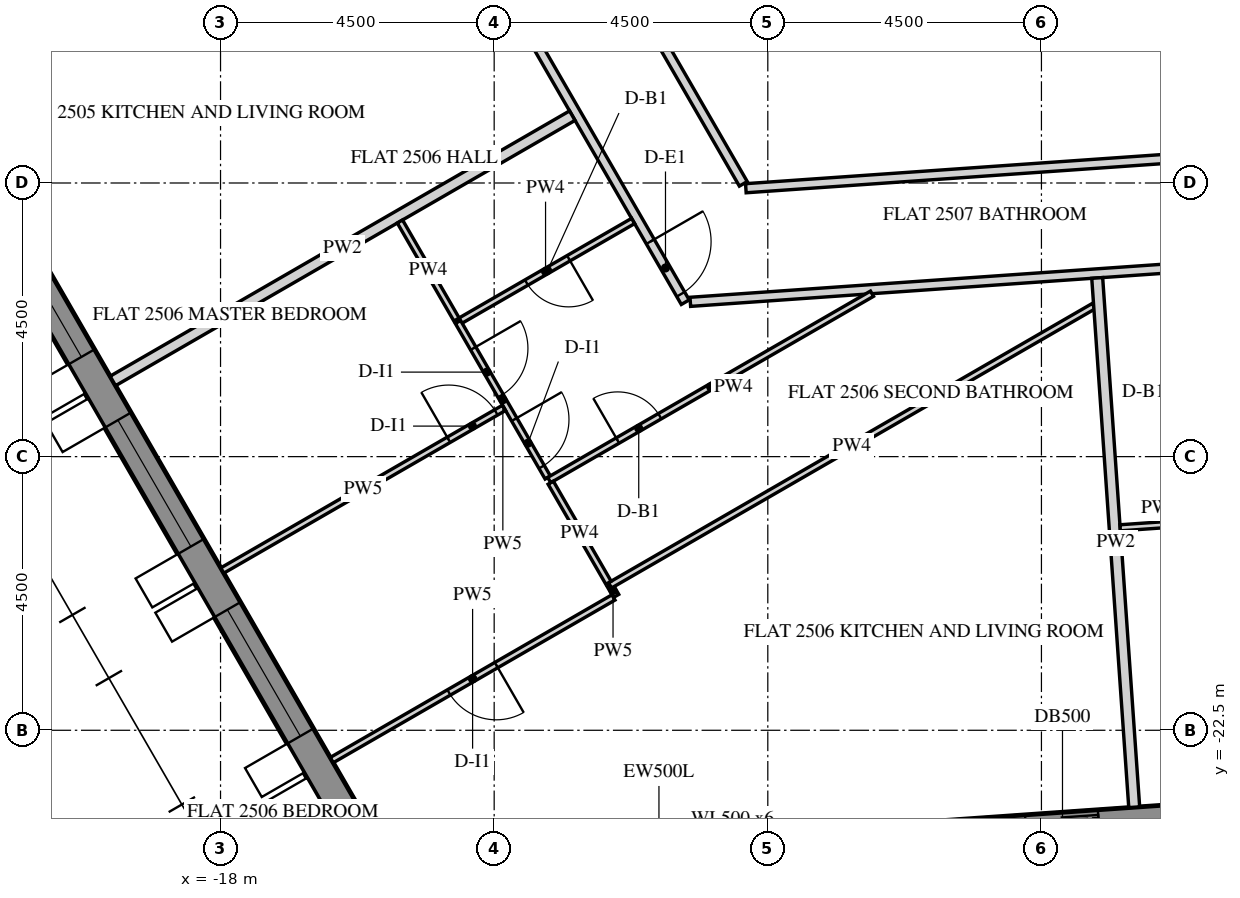
"""IFC4 building model, lengths in metres.
Left out: names, types, materials, properties, quantities, classifications, styles, units other than length and angle.
Written with IfcOpenShell. Run it as: python <this file> out.ifc"""

import sys

from ifc_helpers import new_model, si_unit, direction, frame, frame_2d, origin, place, context, subcontext, project, spatial, polyline, rectangle, outline, extrude, element, fill, save


model = new_model("IFC4")
c1 = context("Model", 3, precision=1e-05, world=origin(), true_north=direction((0.0, 1.0)))
c2 = subcontext(c1, "Body", "Model", "MODEL_VIEW")
j1 = project(units=[si_unit("LENGTHUNIT", "METRE"), si_unit("PLANEANGLEUNIT", "RADIAN")], contexts=[c1])
p1 = place(None, origin())
s1 = spatial("IfcSite", under=j1, at=p1, CompositionType="ELEMENT")
p2 = place(p1, origin())
s2 = spatial("IfcBuilding", under=s1, at=p2, CompositionType="ELEMENT")
p3 = place(p2, frame((0.0, 0.0, 314.7)))
s3 = spatial("IfcBuildingStorey", under=s2, at=p3, CompositionType="ELEMENT", Elevation=314.7)
p4 = place(p3, frame((-28.149, -2.745, -0.15), z_axis=(0.0, 0.0, 1.0), x_axis=(0.500003737743, -0.866023245787, 0.0)))
e1 = element("IfcWall", 1, at=p4, inside=s3, PredefinedType="SOLIDWALL", context=c2, shape_type="SweptSolid", body=[
    extrude(outline(polyline([(-0.021, -0.25), (25.468, -0.25), (25.421, 0.25), (0.021, 0.25), (-0.021, -0.25)])), origin(), (0.0, 0.0, 1.0), 3.9),
])
p5 = place(p4, frame((2.522, 0.0, 0.75)))
e2 = element("IfcOpeningElement", 2, at=p5, cuts=e1, PredefinedType="OPENING", context=c2, shape_type="SweptSolid", body=[
    extrude(rectangle(XDim=2.4, YDim=2.7, at=frame_2d((1.2, 1.35))), frame((0.0, 0.26, 0.0), z_axis=(0.0, -1.0, 0.0), x_axis=(1.0, 0.0, 0.0)), (0.0, 0.0, 1.0), 0.52),
])
p6 = place(p4, frame((6.122, 0.0, 0.75)))
e3 = element("IfcOpeningElement", 3, at=p6, cuts=e1, PredefinedType="OPENING", context=c2, shape_type="SweptSolid", body=[
    extrude(rectangle(XDim=2.4, YDim=2.7, at=frame_2d((1.2, 1.35))), frame((0.0, 0.26, 0.0), z_axis=(0.0, -1.0, 0.0), x_axis=(1.0, 0.0, 0.0)), (0.0, 0.0, 1.0), 0.52),
])
p7 = place(p4, frame((9.722, 0.0, 0.75)))
e4 = element("IfcOpeningElement", 4, at=p7, cuts=e1, PredefinedType="OPENING", context=c2, shape_type="SweptSolid", body=[
    extrude(rectangle(XDim=2.4, YDim=2.7, at=frame_2d((1.2, 1.35))), frame((0.0, 0.26, 0.0), z_axis=(0.0, -1.0, 0.0), x_axis=(1.0, 0.0, 0.0)), (0.0, 0.0, 1.0), 0.52),
])
p8 = place(p4, frame((13.323, 0.0, 0.75)))
e5 = element("IfcOpeningElement", 5, at=p8, cuts=e1, PredefinedType="OPENING", context=c2, shape_type="SweptSolid", body=[
    extrude(rectangle(XDim=2.4, YDim=2.7, at=frame_2d((1.2, 1.35))), frame((0.0, 0.26, 0.0), z_axis=(0.0, -1.0, 0.0), x_axis=(1.0, 0.0, 0.0)), (0.0, 0.0, 1.0), 0.52),
])
p9 = place(p4, frame((16.922, 0.0, 0.75)))
e6 = element("IfcOpeningElement", 6, at=p9, cuts=e1, PredefinedType="OPENING", context=c2, shape_type="SweptSolid", body=[
    extrude(rectangle(XDim=2.4, YDim=2.7, at=frame_2d((1.2, 1.35))), frame((0.0, 0.26, 0.0), z_axis=(0.0, -1.0, 0.0), x_axis=(1.0, 0.0, 0.0)), (0.0, 0.0, 1.0), 0.52),
])
p10 = place(p4, frame((20.522, 0.0, 0.75)))
e7 = element("IfcOpeningElement", 7, at=p10, cuts=e1, PredefinedType="OPENING", context=c2, shape_type="SweptSolid", body=[
    extrude(rectangle(XDim=2.4, YDim=2.7, at=frame_2d((1.2, 1.35))), frame((0.0, 0.26, 0.0), z_axis=(0.0, -1.0, 0.0), x_axis=(1.0, 0.0, 0.0)), (0.0, 0.0, 1.0), 0.52),
])
p11 = place(p3, frame((-10.86, -24.567, -0.15), z_axis=(0.0, 0.0, 1.0), x_axis=(0.997564329317, 0.06975248292, 0.0)))
e8 = element("IfcWall", 8, at=p11, inside=s3, PredefinedType="SOLIDWALL", context=c2, shape_type="SweptSolid", body=[
    extrude(outline(polyline([(0.25, -0.25), (22.795, -0.25), (23.295, 0.25), (-0.25, 0.25), (0.25, -0.25)])), origin(), (0.0, 0.0, 1.0), 3.9),
])
p12 = place(p11, frame((1.323, 0.0, 1.05)))
e9 = element("IfcOpeningElement", 9, at=p12, cuts=e8, PredefinedType="OPENING", context=c2, shape_type="SweptSolid", body=[
    extrude(rectangle(XDim=0.9, YDim=1.5, at=frame_2d((0.45, 0.75))), frame((0.0, 0.26, 0.0), z_axis=(0.0, -1.0, 0.0), x_axis=(1.0, 0.0, 0.0)), (0.0, 0.0, 1.0), 0.52),
])
p13 = place(p11, frame((2.522, 0.0, 0.15)))
e10 = element("IfcOpeningElement", 10, at=p13, cuts=e8, PredefinedType="OPENING", context=c2, shape_type="SweptSolid", body=[
    extrude(rectangle(XDim=1.2, YDim=2.4, at=frame_2d((0.6, 1.2))), frame((0.0, 0.26, 0.0), z_axis=(0.0, -1.0, 0.0), x_axis=(1.0, 0.0, 0.0)), (0.0, 0.0, 1.0), 0.52),
])
p14 = place(p11, frame((4.922, 0.0, 1.05)))
e11 = element("IfcOpeningElement", 11, at=p14, cuts=e8, PredefinedType="OPENING", context=c2, shape_type="SweptSolid", body=[
    extrude(rectangle(XDim=0.9, YDim=1.5, at=frame_2d((0.45, 0.75))), frame((0.0, 0.26, 0.0), z_axis=(0.0, -1.0, 0.0), x_axis=(1.0, 0.0, 0.0)), (0.0, 0.0, 1.0), 0.52),
])
p15 = place(p11, frame((6.122, 0.0, 0.15)))
e12 = element("IfcOpeningElement", 12, at=p15, cuts=e8, PredefinedType="OPENING", context=c2, shape_type="SweptSolid", body=[
    extrude(rectangle(XDim=1.2, YDim=2.4, at=frame_2d((0.6, 1.2))), frame((0.0, 0.26, 0.0), z_axis=(0.0, -1.0, 0.0), x_axis=(1.0, 0.0, 0.0)), (0.0, 0.0, 1.0), 0.52),
])
p16 = place(p11, frame((8.522, 0.0, 1.05)))
e13 = element("IfcOpeningElement", 13, at=p16, cuts=e8, PredefinedType="OPENING", context=c2, shape_type="SweptSolid", body=[
    extrude(rectangle(XDim=0.9, YDim=1.5, at=frame_2d((0.45, 0.75))), frame((0.0, 0.26, 0.0), z_axis=(0.0, -1.0, 0.0), x_axis=(1.0, 0.0, 0.0)), (0.0, 0.0, 1.0), 0.52),
])
p17 = place(p11, frame((9.722, 0.0, 0.15)))
e14 = element("IfcOpeningElement", 14, at=p17, cuts=e8, PredefinedType="OPENING", context=c2, shape_type="SweptSolid", body=[
    extrude(rectangle(XDim=1.2, YDim=2.4, at=frame_2d((0.6, 1.2))), frame((0.0, 0.26, 0.0), z_axis=(0.0, -1.0, 0.0), x_axis=(1.0, 0.0, 0.0)), (0.0, 0.0, 1.0), 0.52),
])
p18 = place(p11, frame((12.122, 0.0, 1.05)))
e15 = element("IfcOpeningElement", 15, at=p18, cuts=e8, PredefinedType="OPENING", context=c2, shape_type="SweptSolid", body=[
    extrude(rectangle(XDim=0.9, YDim=1.5, at=frame_2d((0.45, 0.75))), frame((0.0, 0.26, 0.0), z_axis=(0.0, -1.0, 0.0), x_axis=(1.0, 0.0, 0.0)), (0.0, 0.0, 1.0), 0.52),
])
p19 = place(p11, frame((13.323, 0.0, 0.15)))
e16 = element("IfcOpeningElement", 16, at=p19, cuts=e8, PredefinedType="OPENING", context=c2, shape_type="SweptSolid", body=[
    extrude(rectangle(XDim=1.2, YDim=2.4, at=frame_2d((0.6, 1.2))), frame((0.0, 0.26, 0.0), z_axis=(0.0, -1.0, 0.0), x_axis=(1.0, 0.0, 0.0)), (0.0, 0.0, 1.0), 0.52),
])
p20 = place(p11, frame((15.722, 0.0, 1.05)))
e17 = element("IfcOpeningElement", 17, at=p20, cuts=e8, PredefinedType="OPENING", context=c2, shape_type="SweptSolid", body=[
    extrude(rectangle(XDim=0.9, YDim=1.5, at=frame_2d((0.45, 0.75))), frame((0.0, 0.26, 0.0), z_axis=(0.0, -1.0, 0.0), x_axis=(1.0, 0.0, 0.0)), (0.0, 0.0, 1.0), 0.52),
])
p21 = place(p11, frame((16.922, 0.0, 0.15)))
e18 = element("IfcOpeningElement", 18, at=p21, cuts=e8, PredefinedType="OPENING", context=c2, shape_type="SweptSolid", body=[
    extrude(rectangle(XDim=1.2, YDim=2.4, at=frame_2d((0.6, 1.2))), frame((0.0, 0.26, 0.0), z_axis=(0.0, -1.0, 0.0), x_axis=(1.0, 0.0, 0.0)), (0.0, 0.0, 1.0), 0.52),
])
p22 = place(p11, frame((19.323, 0.0, 1.05)))
e19 = element("IfcOpeningElement", 19, at=p22, cuts=e8, PredefinedType="OPENING", context=c2, shape_type="SweptSolid", body=[
    extrude(rectangle(XDim=0.9, YDim=1.5, at=frame_2d((0.45, 0.75))), frame((0.0, 0.26, 0.0), z_axis=(0.0, -1.0, 0.0), x_axis=(1.0, 0.0, 0.0)), (0.0, 0.0, 1.0), 0.52),
])
p23 = place(p11, frame((20.522, 0.0, 0.15)))
e20 = element("IfcOpeningElement", 20, at=p23, cuts=e8, PredefinedType="OPENING", context=c2, shape_type="SweptSolid", body=[
    extrude(rectangle(XDim=1.2, YDim=2.4, at=frame_2d((0.6, 1.2))), frame((0.0, 0.26, 0.0), z_axis=(0.0, -1.0, 0.0), x_axis=(1.0, 0.0, 0.0)), (0.0, 0.0, 1.0), 0.52),
])
p24 = place(p3, frame((-17.659, -2.814, 0.0), z_axis=(0.0, 0.0, 1.0), x_axis=(0.499992611149, -0.866029669697, 0.0)))
e21 = element("IfcWall", 21, at=p24, inside=s3, PredefinedType="PARTITIONING", context=c2, shape_type="SweptSolid", body=[
    extrude(rectangle(XDim=14.602, YDim=0.15, at=frame_2d((7.301, 0.0))), origin(), (0.0, 0.0, 1.0), 2.988),
])
p25 = place(p24, frame((2.925, 0.0, 0.0)))
e22 = element("IfcOpeningElement", 22, at=p25, cuts=e21, PredefinedType="OPENING", context=c2, shape_type="SweptSolid", body=[
    extrude(rectangle(XDim=1.0, YDim=2.1, at=frame_2d((0.5, 1.05))), frame((0.0, 0.085, 0.0), z_axis=(0.0, -1.0, 0.0), x_axis=(1.0, 0.0, 0.0)), (0.0, 0.0, 1.0), 0.17),
])
p26 = place(p24, frame((13.452, 0.0, 0.0)))
e23 = element("IfcOpeningElement", 23, at=p26, cuts=e21, PredefinedType="OPENING", context=c2, shape_type="SweptSolid", body=[
    extrude(rectangle(XDim=1.0, YDim=2.1, at=frame_2d((0.5, 1.05))), frame((0.0, 0.085, 0.0), z_axis=(0.0, -1.0, 0.0), x_axis=(1.0, 0.0, 0.0)), (0.0, 0.0, 1.0), 0.17),
])
p27 = place(p3, frame((-10.274, -15.454, 0.0), z_axis=(0.0, 0.0, 1.0), x_axis=(0.997564284069, 0.069753130035, 0.0)))
e24 = element("IfcWall", 24, at=p27, inside=s3, PredefinedType="PARTITIONING", context=c2, shape_type="SweptSolid", body=[
    extrude(rectangle(XDim=16.272, YDim=0.15, at=frame_2d((8.136, 0.0))), origin(), (0.0, 0.0, 1.0), 2.988),
])
p28 = place(p27, frame((9.503, 0.0, 0.0)))
e25 = element("IfcOpeningElement", 25, at=p28, cuts=e24, PredefinedType="OPENING", context=c2, shape_type="SweptSolid", body=[
    extrude(rectangle(XDim=1.0, YDim=2.1, at=frame_2d((0.5, 1.05))), frame((0.0, 0.085, 0.0), z_axis=(0.0, -1.0, 0.0), x_axis=(1.0, 0.0, 0.0)), (0.0, 0.0, 1.0), 0.17),
])
p29 = place(p3, frame((6.551, -12.473, 0.0), z_axis=(0.0, 0.0, 1.0), x_axis=(-0.997563421853, -0.069765459797, 0.0)))
e26 = element("IfcWall", 26, at=p29, inside=s3, PredefinedType="PARTITIONING", context=c2, shape_type="SweptSolid", body=[
    extrude(rectangle(XDim=15.95, YDim=0.15, at=frame_2d((7.975, 0.0))), origin(), (0.0, 0.0, 1.0), 2.988),
])
p30 = place(p29, frame((7.525, 0.0, 0.0)))
e27 = element("IfcOpeningElement", 27, at=p30, cuts=e26, PredefinedType="OPENING", context=c2, shape_type="SweptSolid", body=[
    extrude(rectangle(XDim=0.9, YDim=2.1, at=frame_2d((0.45, 1.05))), frame((0.0, 0.085, 0.0), z_axis=(0.0, -1.0, 0.0), x_axis=(1.0, 0.0, 0.0)), (0.0, 0.0, 1.0), 0.17),
])
p31 = place(p3, frame((-9.403, -13.514, 0.0), z_axis=(0.0, 0.0, 1.0), x_axis=(-0.499998061752, 0.866026522829, 0.0)))
e28 = element("IfcWall", 28, at=p31, inside=s3, PredefinedType="PARTITIONING", context=c2, shape_type="SweptSolid", body=[
    extrude(rectangle(XDim=5.981, YDim=0.15, at=frame_2d((2.99, 0.0))), origin(), (0.0, 0.0, 1.0), 2.988),
])
p32 = place(p3, frame((-19.771, -16.755, 0.0), z_axis=(0.0, 0.0, 1.0), x_axis=(0.866025292695, 0.500000192413, 0.0)))
e29 = element("IfcWall", 29, at=p32, inside=s3, PredefinedType="PARTITIONING", context=c2, shape_type="SweptSolid", body=[
    extrude(rectangle(XDim=8.725, YDim=0.18, at=frame_2d((4.363, 0.0))), origin(), (0.0, 0.0, 1.0), 2.988),
])
p33 = place(p3, frame((-11.596, -20.116, 0.0), z_axis=(0.0, 0.0, 1.0), x_axis=(0.500559585819, -0.865702085619, 0.0)))
e30 = element("IfcWall", 30, at=p33, inside=s3, PredefinedType="PARTITIONING", context=c2, shape_type="SweptSolid", body=[
    extrude(rectangle(XDim=0.202, YDim=0.1, at=frame_2d((0.101, 0.0))), origin(), (0.0, 0.0, 1.0), 2.988),
])
p34 = place(p3, frame((-11.538, -20.316, 0.0), z_axis=(0.0, 0.0, 1.0), x_axis=(-0.866032834954, -0.499987128616, 0.0)))
e31 = element("IfcWall", 31, at=p34, inside=s3, PredefinedType="PARTITIONING", context=c2, shape_type="SweptSolid", body=[
    extrude(rectangle(XDim=5.35, YDim=0.1, at=frame_2d((2.675, 0.0))), origin(), (0.0, 0.0, 1.0), 2.988),
])
p35 = place(p34, frame((2.225, 0.0, 0.0)))
e32 = element("IfcOpeningElement", 32, at=p35, cuts=e31, PredefinedType="OPENING", context=c2, shape_type="SweptSolid", body=[
    extrude(rectangle(XDim=0.9, YDim=2.1, at=frame_2d((0.45, 1.05))), frame((0.0, 0.06, 0.0), z_axis=(0.0, -1.0, 0.0), x_axis=(1.0, 0.0, 0.0)), (0.0, 0.0, 1.0), 0.12),
])
p36 = place(p3, frame((-3.641, -15.525, 0.0), z_axis=(0.0, 0.0, 1.0), x_axis=(-0.866026229868, -0.499998569178, 0.0)))
e33 = element("IfcWall", 33, at=p36, inside=s3, PredefinedType="PARTITIONING", context=c2, shape_type="SweptSolid", body=[
    extrude(rectangle(XDim=9.185, YDim=0.1, at=frame_2d((4.592, 0.0))), origin(), (0.0, 0.0, 1.0), 2.988),
])
p37 = place(p3, frame((-2.974, -23.765, 0.0), z_axis=(0.0, 0.0, 1.0), x_axis=(-0.06975756604, 0.997563973878, 0.0)))
e34 = element("IfcWall", 34, at=p37, inside=s3, PredefinedType="PARTITIONING", context=c2, shape_type="SweptSolid", body=[
    extrude(rectangle(XDim=8.725, YDim=0.18, at=frame_2d((4.363, 0.0))), origin(), (0.0, 0.0, 1.0), 2.988),
])
p38 = place(p3, frame((-11.215, -14.125, 0.0), z_axis=(0.0, 0.0, 1.0), x_axis=(-0.866020521143, -0.500008456887, 0.0)))
e35 = element("IfcWall", 35, at=p38, inside=s3, PredefinedType="PARTITIONING", context=c2, shape_type="SweptSolid", body=[
    extrude(rectangle(XDim=3.325, YDim=0.1, at=frame_2d((1.663, 0.0))), origin(), (0.0, 0.0, 1.0), 2.988),
])
p39 = place(p38, frame((1.225, 0.0, 0.0)))
e36 = element("IfcOpeningElement", 36, at=p39, cuts=e35, PredefinedType="OPENING", context=c2, shape_type="SweptSolid", body=[
    extrude(rectangle(XDim=0.8, YDim=2.1, at=frame_2d((0.4, 1.05))), frame((0.0, 0.06, 0.0), z_axis=(0.0, -1.0, 0.0), x_axis=(1.0, 0.0, 0.0)), (0.0, 0.0, 1.0), 0.12),
])
p40 = place(p3, frame((-14.096, -15.785, 0.0), z_axis=(0.0, 0.0, 1.0), x_axis=(0.49999668571, -0.866027317282, 0.0)))
e37 = element("IfcWall", 37, at=p40, inside=s3, PredefinedType="PARTITIONING", context=c2, shape_type="SweptSolid", body=[
    extrude(rectangle(XDim=2.954, YDim=0.1, at=frame_2d((1.477, 0.0))), origin(), (0.0, 0.0, 1.0), 2.988),
])
p41 = place(p40, frame((0.502, 0.0, 0.0)))
e38 = element("IfcOpeningElement", 38, at=p41, cuts=e37, PredefinedType="OPENING", context=c2, shape_type="SweptSolid", body=[
    extrude(rectangle(XDim=0.9, YDim=2.1, at=frame_2d((0.45, 1.05))), frame((0.0, 0.06, 0.0), z_axis=(0.0, -1.0, 0.0), x_axis=(1.0, 0.0, 0.0)), (0.0, 0.0, 1.0), 0.12),
])
p42 = place(p40, frame((1.852, 0.0, 0.0)))
e39 = element("IfcOpeningElement", 39, at=p42, cuts=e37, PredefinedType="OPENING", context=c2, shape_type="SweptSolid", body=[
    extrude(rectangle(XDim=0.9, YDim=2.1, at=frame_2d((0.45, 1.05))), frame((0.0, 0.06, 0.0), z_axis=(0.0, -1.0, 0.0), x_axis=(1.0, 0.0, 0.0)), (0.0, 0.0, 1.0), 0.12),
])
p43 = place(p3, frame((-12.595, -18.385, 0.0), z_axis=(0.0, 0.0, 1.0), x_axis=(0.866031041839, 0.499990234476, 0.0)))
e40 = element("IfcWall", 40, at=p43, inside=s3, PredefinedType="PARTITIONING", context=c2, shape_type="SweptSolid", body=[
    extrude(rectangle(XDim=6.129, YDim=0.1, at=frame_2d((3.065, 0.0))), origin(), (0.0, 0.0, 1.0), 2.988),
])
p44 = place(p43, frame((1.3, 0.0, 0.0)))
e41 = element("IfcOpeningElement", 41, at=p44, cuts=e40, PredefinedType="OPENING", context=c2, shape_type="SweptSolid", body=[
    extrude(rectangle(XDim=0.8, YDim=2.1, at=frame_2d((0.4, 1.05))), frame((0.0, 0.06, 0.0), z_axis=(0.0, -1.0, 0.0), x_axis=(1.0, 0.0, 0.0)), (0.0, 0.0, 1.0), 0.12),
])
p45 = place(p3, frame((-15.05, -14.133, 0.0), z_axis=(0.0, 0.0, 1.0), x_axis=(0.500059143742, -0.865991254436, 0.0)))
e42 = element("IfcWall", 42, at=p45, inside=s3, PredefinedType="PARTITIONING", context=c2, shape_type="SweptSolid", body=[
    extrude(rectangle(XDim=1.862, YDim=0.1, at=frame_2d((0.931, 0.0))), origin(), (0.0, 0.0, 1.0), 2.988),
])
p46 = place(p3, frame((-17.971, -19.873, 0.0), z_axis=(0.0, 0.0, 1.0), x_axis=(0.866032834954, 0.499987128616, 0.0)))
e43 = element("IfcWall", 43, at=p46, inside=s3, PredefinedType="PARTITIONING", context=c2, shape_type="SweptSolid", body=[
    extrude(rectangle(XDim=5.35, YDim=0.1, at=frame_2d((2.675, 0.0))), origin(), (0.0, 0.0, 1.0), 2.988),
])
p47 = place(p46, frame((4.3, 0.0, 0.0)))
e44 = element("IfcOpeningElement", 44, at=p47, cuts=e43, PredefinedType="OPENING", context=c2, shape_type="SweptSolid", body=[
    extrude(rectangle(XDim=0.9, YDim=2.1, at=frame_2d((0.45, 1.05))), frame((0.0, 0.06, 0.0), z_axis=(0.0, -1.0, 0.0), x_axis=(1.0, 0.0, 0.0)), (0.0, 0.0, 1.0), 0.12),
])
p48 = place(p3, frame((-11.62, -20.074, 0.0), z_axis=(0.0, 0.0, 1.0), x_axis=(-0.500119165741, 0.865956592479, 0.0)))
e45 = element("IfcWall", 45, at=p48, inside=s3, PredefinedType="PARTITIONING", context=c2, shape_type="SweptSolid", body=[
    extrude(rectangle(XDim=1.9, YDim=0.1, at=frame_2d((0.95, 0.0))), origin(), (0.0, 0.0, 1.0), 2.988),
])
p49 = place(p3, frame((-3.205, -19.17, 0.0), z_axis=(0.0, 0.0, 1.0), x_axis=(0.99755494671, 0.069886538722, 0.0)))
e46 = element("IfcWall", 46, at=p49, inside=s3, PredefinedType="PARTITIONING", context=c2, shape_type="SweptSolid", body=[
    extrude(rectangle(XDim=1.862, YDim=0.1, at=frame_2d((0.931, 0.0))), origin(), (0.0, 0.0, 1.0), 2.988),
])
p50 = place(p8, frame((0.0, 0.18, 0.0)))
e47 = element("IfcWindow", 47, at=p50, inside=s3, PartitioningType="DOUBLE_PANEL_VERTICAL", PredefinedType="WINDOW", context=c2, shape_type="SweptSolid", body=[
    extrude(rectangle(XDim=2.4, YDim=2.7, at=frame_2d((1.2, 1.35))), frame((0.0, 0.03, 0.0), z_axis=(0.0, -1.0, 0.0), x_axis=(1.0, 0.0, 0.0)), (0.0, 0.0, 1.0), 0.06),
])
fill(e5, e47)
p51 = place(p9, frame((0.0, 0.18, 0.0)))
e48 = element("IfcWindow", 48, at=p51, inside=s3, PartitioningType="DOUBLE_PANEL_VERTICAL", PredefinedType="WINDOW", context=c2, shape_type="SweptSolid", body=[
    extrude(rectangle(XDim=2.4, YDim=2.7, at=frame_2d((1.2, 1.35))), frame((0.0, 0.03, 0.0), z_axis=(0.0, -1.0, 0.0), x_axis=(1.0, 0.0, 0.0)), (0.0, 0.0, 1.0), 0.06),
])
fill(e6, e48)
p52 = place(p10, frame((0.0, 0.18, 0.0)))
e49 = element("IfcWindow", 49, at=p52, inside=s3, PartitioningType="DOUBLE_PANEL_VERTICAL", PredefinedType="WINDOW", context=c2, shape_type="SweptSolid", body=[
    extrude(rectangle(XDim=2.4, YDim=2.7, at=frame_2d((1.2, 1.35))), frame((0.0, 0.03, 0.0), z_axis=(0.0, -1.0, 0.0), x_axis=(1.0, 0.0, 0.0)), (0.0, 0.0, 1.0), 0.06),
])
fill(e7, e49)
p53 = place(p15, frame((0.0, 0.175, 0.0)))
e50 = element("IfcDoor", 50, at=p53, inside=s3, OperationType="SLIDING_TO_LEFT", PredefinedType="DOOR", context=c2, shape_type="SweptSolid", body=[
    extrude(rectangle(XDim=1.2, YDim=2.4, at=frame_2d((0.6, 1.2))), frame((0.0, 0.025, 0.0), z_axis=(0.0, -1.0, 0.0), x_axis=(1.0, 0.0, 0.0)), (0.0, 0.0, 1.0), 0.05),
])
fill(e12, e50)
p54 = place(p26, origin())
e51 = element("IfcDoor", 51, at=p54, inside=s3, OperationType="SINGLE_SWING_LEFT", PredefinedType="DOOR", context=c2, shape_type="SweptSolid", body=[
    extrude(rectangle(XDim=1.0, YDim=2.1, at=frame_2d((0.5, 1.05))), frame((0.0, 0.025, 0.0), z_axis=(0.0, -1.0, 0.0), x_axis=(1.0, 0.0, 0.0)), (0.0, 0.0, 1.0), 0.05),
])
fill(e23, e51)
p55 = place(p39, origin())
e52 = element("IfcDoor", 52, at=p55, inside=s3, OperationType="SINGLE_SWING_RIGHT", PredefinedType="DOOR", context=c2, shape_type="SweptSolid", body=[
    extrude(rectangle(XDim=0.8, YDim=2.1, at=frame_2d((0.4, 1.05))), frame((0.0, 0.025, 0.0), z_axis=(0.0, -1.0, 0.0), x_axis=(1.0, 0.0, 0.0)), (0.0, 0.0, 1.0), 0.05),
])
fill(e36, e52)
p56 = place(p41, origin())
e53 = element("IfcDoor", 53, at=p56, inside=s3, OperationType="SINGLE_SWING_LEFT", PredefinedType="DOOR", context=c2, shape_type="SweptSolid", body=[
    extrude(rectangle(XDim=0.9, YDim=2.1, at=frame_2d((0.45, 1.05))), frame((0.0, 0.025, 0.0), z_axis=(0.0, -1.0, 0.0), x_axis=(1.0, 0.0, 0.0)), (0.0, 0.0, 1.0), 0.05),
])
fill(e38, e53)
p57 = place(p47, origin())
e54 = element("IfcDoor", 54, at=p57, inside=s3, OperationType="SINGLE_SWING_RIGHT", PredefinedType="DOOR", context=c2, shape_type="SweptSolid", body=[
    extrude(rectangle(XDim=0.9, YDim=2.1, at=frame_2d((0.45, 1.05))), frame((0.0, 0.025, 0.0), z_axis=(0.0, -1.0, 0.0), x_axis=(1.0, 0.0, 0.0)), (0.0, 0.0, 1.0), 0.05),
])
fill(e44, e54)
p58 = place(p42, origin())
e55 = element("IfcDoor", 55, at=p58, inside=s3, OperationType="SINGLE_SWING_RIGHT", PredefinedType="DOOR", context=c2, shape_type="SweptSolid", body=[
    extrude(rectangle(XDim=0.9, YDim=2.1, at=frame_2d((0.45, 1.05))), frame((0.0, 0.025, 0.0), z_axis=(0.0, -1.0, 0.0), x_axis=(1.0, 0.0, 0.0)), (0.0, 0.0, 1.0), 0.05),
])
fill(e39, e55)
p59 = place(p44, origin())
e56 = element("IfcDoor", 56, at=p59, inside=s3, OperationType="SINGLE_SWING_RIGHT", PredefinedType="DOOR", context=c2, shape_type="SweptSolid", body=[
    extrude(rectangle(XDim=0.8, YDim=2.1, at=frame_2d((0.4, 1.05))), frame((0.0, 0.025, 0.0), z_axis=(0.0, -1.0, 0.0), x_axis=(1.0, 0.0, 0.0)), (0.0, 0.0, 1.0), 0.05),
])
fill(e41, e56)
p60 = place(p35, origin())
e57 = element("IfcDoor", 57, at=p60, inside=s3, OperationType="SINGLE_SWING_RIGHT", PredefinedType="DOOR", context=c2, shape_type="SweptSolid", body=[
    extrude(rectangle(XDim=0.9, YDim=2.1, at=frame_2d((0.45, 1.05))), frame((0.0, 0.025, 0.0), z_axis=(0.0, -1.0, 0.0), x_axis=(1.0, 0.0, 0.0)), (0.0, 0.0, 1.0), 0.05),
])
fill(e32, e57)
save(model, sys.argv[1])
